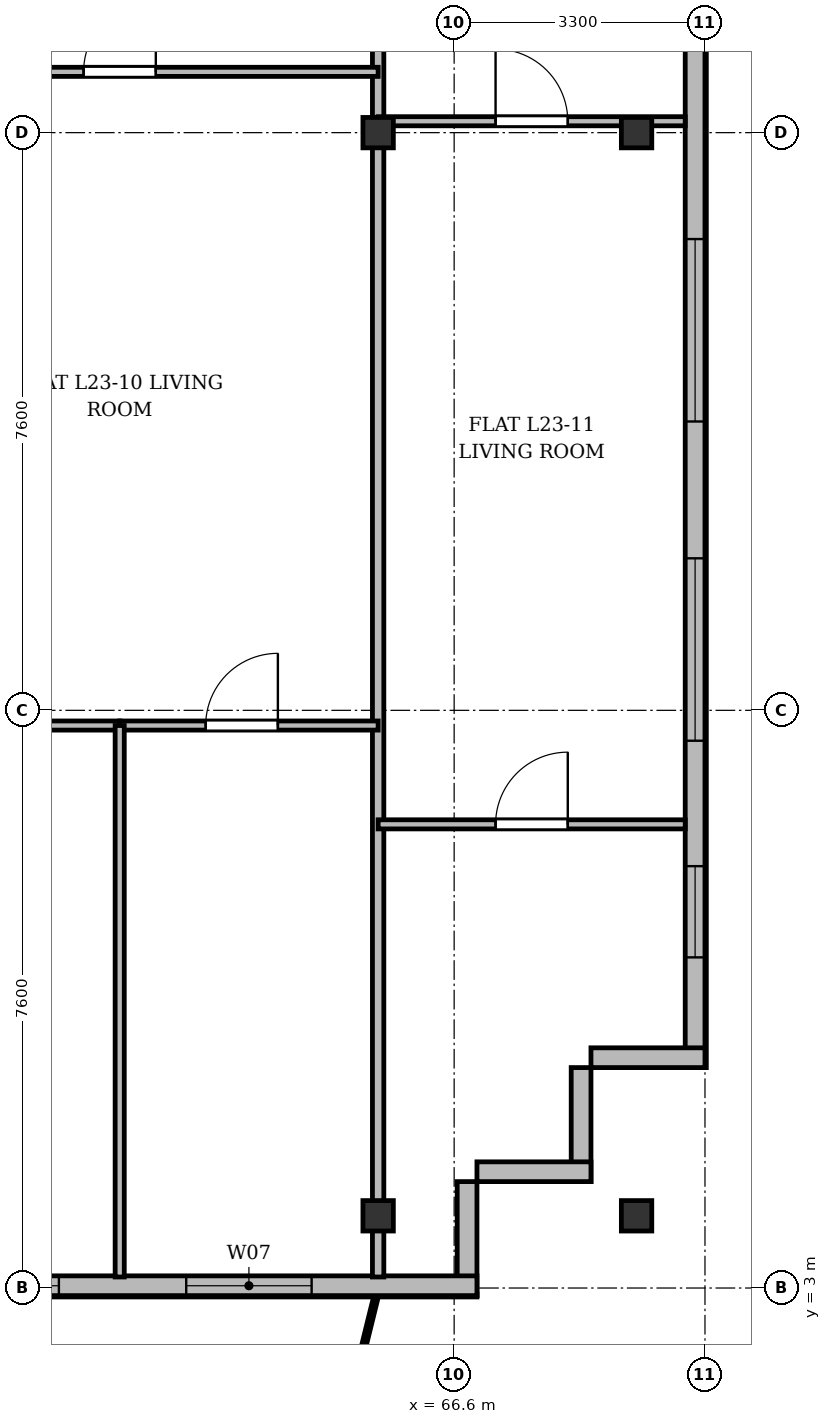
"""IFC4 building model, lengths in metres.
Left out: names, types, materials, properties, quantities, classifications, styles, units other than length and angle.
Written with IfcOpenShell. Run it as: python <this file> out.ifc"""

import sys

from ifc_helpers import new_model, si_unit, direction, frame, frame_2d, origin, origin_2d, place, context, subcontext, project, spatial, rectangle, i_section, extrude, source, transform, mapped, element, fill, save


model = new_model("IFC4")
c1 = context("Model", 3, precision=1e-05, world=origin(), true_north=direction((0.0, 1.0)))
c2 = subcontext(c1, "Body", "Model", "MODEL_VIEW")
j1 = project(units=[si_unit("LENGTHUNIT", "METRE"), si_unit("PLANEANGLEUNIT", "RADIAN")], contexts=[c1])
p1 = place(None, origin())
s1 = spatial("IfcSite", under=j1, at=p1, CompositionType="ELEMENT")
p2 = place(p1, origin())
s2 = spatial("IfcBuilding", under=s1, at=p2, CompositionType="ELEMENT")
p3 = place(p2, frame((0.0, 0.0, 92.5)))
s3 = spatial("IfcBuildingStorey", under=s2, at=p3, CompositionType="ELEMENT", Elevation=92.5)
m1 = source(origin(), c2, "Body", "SweptSolid", [
    extrude(i_section(OverallWidth=0.4, OverallDepth=0.4, WebThickness=0.022, FlangeThickness=0.035, at=origin_2d()), origin(), (0.0, 0.0, 1.0), 3.6),
])
for number, where, z_axis, x_axis in (
    (1, (65.6, 3.95, 0.0), (0.0, 0.0, 1.0), (1.0, 0.0, 0.0)),
    (2, (65.6, 18.2, 0.0), (0.0, 0.0, 1.0), (1.0, 0.0, 0.0)),
    (3, (69.0, 3.95, 0.0), (0.0, 0.0, 1.0), (1.0, 0.0, 0.0)),
    (4, (69.0, 18.2, 0.0), (0.0, 0.0, 1.0), (1.0, 0.0, 0.0)),
):
    element("IfcColumn", number, at=place(p3, frame(where, z_axis=z_axis, x_axis=x_axis)), inside=s3, PredefinedType="COLUMN", context=c2, shape_type="MappedRepresentation", body=[
        mapped(m1, transform((0.0, 0.0, 0.0), x_axis=(1.0, 0.0, 0.0), y_axis=(0.0, 1.0, 0.0), z_axis=(0.0, 0.0, 1.0), scale=1.0)),
    ])
p4 = place(p3, frame((69.77, 45.5, 0.0), z_axis=(0.0, 0.0, 1.0), x_axis=(0.0, -1.0, 0.0)))
e5 = element("IfcWall", 5, at=p4, inside=s3, PredefinedType="SOLIDWALL", context=c2, shape_type="SweptSolid", body=[
    extrude(rectangle(XDim=39.6, YDim=0.26, at=frame_2d((19.8, 0.0))), origin(), (0.0, 0.0, 1.0), 3.34),
])
p5 = place(p4, frame((36.95, 0.0, 0.92)))
e6 = element("IfcOpeningElement", 6, at=p5, cuts=e5, PredefinedType="OPENING", context=c2, shape_type="SweptSolid", body=[
    extrude(rectangle(XDim=1.2, YDim=1.65, at=frame_2d((0.6, 0.825))), frame((0.0, 0.14, 0.0), z_axis=(0.0, -1.0, 0.0), x_axis=(1.0, 0.0, 0.0)), (0.0, 0.0, 1.0), 0.28),
])
p6 = place(p4, frame((32.9, 0.0, 0.92)))
e7 = element("IfcOpeningElement", 7, at=p6, cuts=e5, PredefinedType="OPENING", context=c2, shape_type="SweptSolid", body=[
    extrude(rectangle(XDim=2.4, YDim=2.1, at=frame_2d((1.2, 1.05))), frame((0.0, 0.14, 0.0), z_axis=(0.0, -1.0, 0.0), x_axis=(1.0, 0.0, 0.0)), (0.0, 0.0, 1.0), 0.28),
])
p7 = place(p4, frame((28.7, 0.0, 0.92)))
e8 = element("IfcOpeningElement", 8, at=p7, cuts=e5, PredefinedType="OPENING", context=c2, shape_type="SweptSolid", body=[
    extrude(rectangle(XDim=2.4, YDim=2.1, at=frame_2d((1.2, 1.05))), frame((0.0, 0.14, 0.0), z_axis=(0.0, -1.0, 0.0), x_axis=(1.0, 0.0, 0.0)), (0.0, 0.0, 1.0), 0.28),
])
p8 = place(p4, frame((21.5, 0.0, 0.92)))
e9 = element("IfcOpeningElement", 9, at=p8, cuts=e5, PredefinedType="OPENING", context=c2, shape_type="SweptSolid", body=[
    extrude(rectangle(XDim=2.4, YDim=2.1, at=frame_2d((1.2, 1.05))), frame((0.0, 0.14, 0.0), z_axis=(0.0, -1.0, 0.0), x_axis=(1.0, 0.0, 0.0)), (0.0, 0.0, 1.0), 0.28),
])
p9 = place(p4, frame((7.5, 0.0, 0.92)))
e10 = element("IfcOpeningElement", 10, at=p9, cuts=e5, PredefinedType="OPENING", context=c2, shape_type="SweptSolid", body=[
    extrude(rectangle(XDim=2.4, YDim=2.1, at=frame_2d((1.2, 1.05))), frame((0.0, 0.14, 0.0), z_axis=(0.0, -1.0, 0.0), x_axis=(1.0, 0.0, 0.0)), (0.0, 0.0, 1.0), 0.28),
])
p10 = place(p4, frame((4.5, 0.0, 0.92)))
e11 = element("IfcOpeningElement", 11, at=p10, cuts=e5, PredefinedType="OPENING", context=c2, shape_type="SweptSolid", body=[
    extrude(rectangle(XDim=1.2, YDim=1.65, at=frame_2d((0.6, 0.825))), frame((0.0, 0.14, 0.0), z_axis=(0.0, -1.0, 0.0), x_axis=(1.0, 0.0, 0.0)), (0.0, 0.0, 1.0), 0.28),
])
p11 = place(p4, frame((1.15, 0.0, 0.92)))
e12 = element("IfcOpeningElement", 12, at=p11, cuts=e5, PredefinedType="OPENING", context=c2, shape_type="SweptSolid", body=[
    extrude(rectangle(XDim=1.2, YDim=1.65, at=frame_2d((0.6, 0.825))), frame((0.0, 0.14, 0.0), z_axis=(0.0, -1.0, 0.0), x_axis=(1.0, 0.0, 0.0)), (0.0, 0.0, 1.0), 0.28),
])
p12 = place(p3, frame((69.9, 6.03, 0.0), z_axis=(0.0, 0.0, 1.0), x_axis=(-1.0, 0.0, 0.0)))
e13 = element("IfcWall", 13, at=p12, inside=s3, PredefinedType="SOLIDWALL", context=c2, shape_type="SweptSolid", body=[
    extrude(rectangle(XDim=1.5, YDim=0.26, at=frame_2d((0.75, 0.0))), origin(), (0.0, 0.0, 1.0), 2.84),
])
for number, where, z_axis, x_axis in (
    (14, (68.27, 5.9, 0.0), (0.0, 0.0, 1.0), (0.0, -1.0, 0.0)),
    (15, (68.4, 4.53, 0.0), (0.0, 0.0, 1.0), (-1.0, 0.0, 0.0)),
):
    element("IfcWall", number, at=place(p3, frame(where, z_axis=z_axis, x_axis=x_axis)), inside=s3, PredefinedType="SOLIDWALL", context=c2, shape_type="SweptSolid", body=[
        extrude(rectangle(XDim=1.5, YDim=0.26, at=frame_2d((0.75, 0.0))), origin(), (0.0, 0.0, 1.0), 3.34),
    ])
p13 = place(p3, frame((66.77, 4.4, 0.0), z_axis=(0.0, 0.0, 1.0), x_axis=(0.0, -1.0, 0.0)))
e16 = element("IfcWall", 16, at=p13, inside=s3, PredefinedType="SOLIDWALL", context=c2, shape_type="SweptSolid", body=[
    extrude(rectangle(XDim=1.5, YDim=0.26, at=frame_2d((0.75, 0.0))), origin(), (0.0, 0.0, 1.0), 2.752),
])
p14 = place(p3, frame((66.9, 3.03, 0.0), z_axis=(0.0, 0.0, 1.0), x_axis=(-1.0, 0.0, 0.0)))
e17 = element("IfcWall", 17, at=p14, inside=s3, PredefinedType="SOLIDWALL", context=c2, shape_type="SweptSolid", body=[
    extrude(rectangle(XDim=59.4, YDim=0.26, at=frame_2d((29.7, 0.0))), origin(), (0.0, 0.0, 1.0), 3.34),
])
p15 = place(p14, frame((2.175, 0.0, 0.9)))
e18 = element("IfcOpeningElement", 18, at=p15, cuts=e17, PredefinedType="OPENING", context=c2, shape_type="SweptSolid", body=[
    extrude(rectangle(XDim=1.65, YDim=1.85, at=frame_2d((0.825, 0.925))), frame((0.0, 0.14, 0.0), z_axis=(0.0, -1.0, 0.0), x_axis=(1.0, 0.0, 0.0)), (0.0, 0.0, 1.0), 0.28),
])
p16 = place(p14, frame((5.5, 0.0, 0.9)))
e19 = element("IfcOpeningElement", 19, at=p16, cuts=e17, PredefinedType="OPENING", context=c2, shape_type="SweptSolid", body=[
    extrude(rectangle(XDim=1.8, YDim=1.8, at=frame_2d((0.9, 0.9))), frame((0.0, 0.14, 0.0), z_axis=(0.0, -1.0, 0.0), x_axis=(1.0, 0.0, 0.0)), (0.0, 0.0, 1.0), 0.28),
])
p17 = place(p14, frame((8.65, 0.0, 0.9)))
e20 = element("IfcOpeningElement", 20, at=p17, cuts=e17, PredefinedType="OPENING", context=c2, shape_type="SweptSolid", body=[
    extrude(rectangle(XDim=1.5, YDim=1.75, at=frame_2d((0.75, 0.875))), frame((0.0, 0.14, 0.0), z_axis=(0.0, -1.0, 0.0), x_axis=(1.0, 0.0, 0.0)), (0.0, 0.0, 1.0), 0.28),
])
p18 = place(p14, frame((11.25, 0.0, 0.9)))
e21 = element("IfcOpeningElement", 21, at=p18, cuts=e17, PredefinedType="OPENING", context=c2, shape_type="SweptSolid", body=[
    extrude(rectangle(XDim=1.5, YDim=1.75, at=frame_2d((0.75, 0.875))), frame((0.0, 0.14, 0.0), z_axis=(0.0, -1.0, 0.0), x_axis=(1.0, 0.0, 0.0)), (0.0, 0.0, 1.0), 0.28),
])
p19 = place(p14, frame((13.6, 0.0, 0.9)))
e22 = element("IfcOpeningElement", 22, at=p19, cuts=e17, PredefinedType="OPENING", context=c2, shape_type="SweptSolid", body=[
    extrude(rectangle(XDim=2.0, YDim=1.95, at=frame_2d((1.0, 0.975))), frame((0.0, 0.14, 0.0), z_axis=(0.0, -1.0, 0.0), x_axis=(1.0, 0.0, 0.0)), (0.0, 0.0, 1.0), 0.28),
])
p20 = place(p14, frame((16.775, 0.0, 0.9)))
e23 = element("IfcOpeningElement", 23, at=p20, cuts=e17, PredefinedType="OPENING", context=c2, shape_type="SweptSolid", body=[
    extrude(rectangle(XDim=1.65, YDim=1.85, at=frame_2d((0.825, 0.925))), frame((0.0, 0.14, 0.0), z_axis=(0.0, -1.0, 0.0), x_axis=(1.0, 0.0, 0.0)), (0.0, 0.0, 1.0), 0.28),
])
p21 = place(p14, frame((20.227, 0.0, 0.0)))
e24 = element("IfcOpeningElement", 24, at=p21, cuts=e17, PredefinedType="OPENING", context=c2, shape_type="SweptSolid", body=[
    extrude(rectangle(XDim=1.2, YDim=2.2, at=frame_2d((0.6, 1.1))), frame((0.0, 0.14, 0.0), z_axis=(0.0, -1.0, 0.0), x_axis=(1.0, 0.0, 0.0)), (0.0, 0.0, 1.0), 0.28),
])
p22 = place(p14, frame((28.6, 0.0, 0.9)))
e25 = element("IfcOpeningElement", 25, at=p22, cuts=e17, PredefinedType="OPENING", context=c2, shape_type="SweptSolid", body=[
    extrude(rectangle(XDim=2.2, YDim=1.8, at=frame_2d((1.1, 0.9))), frame((0.0, 0.14, 0.0), z_axis=(0.0, -1.0, 0.0), x_axis=(1.0, 0.0, 0.0)), (0.0, 0.0, 1.0), 0.28),
])
p23 = place(p14, frame((36.75, 0.0, 0.9)))
e26 = element("IfcOpeningElement", 26, at=p23, cuts=e17, PredefinedType="OPENING", context=c2, shape_type="SweptSolid", body=[
    extrude(rectangle(XDim=1.5, YDim=1.75, at=frame_2d((0.75, 0.875))), frame((0.0, 0.14, 0.0), z_axis=(0.0, -1.0, 0.0), x_axis=(1.0, 0.0, 0.0)), (0.0, 0.0, 1.0), 0.28),
])
p24 = place(p14, frame((39.15, 0.0, 0.9)))
e27 = element("IfcOpeningElement", 27, at=p24, cuts=e17, PredefinedType="OPENING", context=c2, shape_type="SweptSolid", body=[
    extrude(rectangle(XDim=1.5, YDim=1.75, at=frame_2d((0.75, 0.875))), frame((0.0, 0.14, 0.0), z_axis=(0.0, -1.0, 0.0), x_axis=(1.0, 0.0, 0.0)), (0.0, 0.0, 1.0), 0.28),
])
p25 = place(p14, frame((41.475, 0.0, 0.9)))
e28 = element("IfcOpeningElement", 28, at=p25, cuts=e17, PredefinedType="OPENING", context=c2, shape_type="SweptSolid", body=[
    extrude(rectangle(XDim=1.65, YDim=1.85, at=frame_2d((0.825, 0.925))), frame((0.0, 0.14, 0.0), z_axis=(0.0, -1.0, 0.0), x_axis=(1.0, 0.0, 0.0)), (0.0, 0.0, 1.0), 0.28),
])
p26 = place(p14, frame((45.36, 0.0, 0.0)))
e29 = element("IfcOpeningElement", 29, at=p26, cuts=e17, PredefinedType="OPENING", context=c2, shape_type="SweptSolid", body=[
    extrude(rectangle(XDim=1.2, YDim=2.2, at=frame_2d((0.6, 1.1))), frame((0.0, 0.14, 0.0), z_axis=(0.0, -1.0, 0.0), x_axis=(1.0, 0.0, 0.0)), (0.0, 0.0, 1.0), 0.28),
])
p27 = place(p14, frame((48.2, 0.0, 0.9)))
e30 = element("IfcOpeningElement", 30, at=p27, cuts=e17, PredefinedType="OPENING", context=c2, shape_type="SweptSolid", body=[
    extrude(rectangle(XDim=2.2, YDim=1.8, at=frame_2d((1.1, 0.9))), frame((0.0, 0.14, 0.0), z_axis=(0.0, -1.0, 0.0), x_axis=(1.0, 0.0, 0.0)), (0.0, 0.0, 1.0), 0.28),
])
p28 = place(p14, frame((52.25, 0.0, 0.9)))
e31 = element("IfcOpeningElement", 31, at=p28, cuts=e17, PredefinedType="OPENING", context=c2, shape_type="SweptSolid", body=[
    extrude(rectangle(XDim=1.5, YDim=1.75, at=frame_2d((0.75, 0.875))), frame((0.0, 0.14, 0.0), z_axis=(0.0, -1.0, 0.0), x_axis=(1.0, 0.0, 0.0)), (0.0, 0.0, 1.0), 0.28),
])
p29 = place(p14, frame((55.4, 0.0, 0.9)))
e32 = element("IfcOpeningElement", 32, at=p29, cuts=e17, PredefinedType="OPENING", context=c2, shape_type="SweptSolid", body=[
    extrude(rectangle(XDim=2.0, YDim=1.95, at=frame_2d((1.0, 0.975))), frame((0.0, 0.14, 0.0), z_axis=(0.0, -1.0, 0.0), x_axis=(1.0, 0.0, 0.0)), (0.0, 0.0, 1.0), 0.28),
])
p30 = place(p3, frame((65.6, 3.145, 0.0), z_axis=(0.0, 0.0, 1.0), x_axis=(0.0, 1.0, 0.0)))
e33 = element("IfcWall", 33, at=p30, inside=s3, PredefinedType="PARTITIONING", context=c2, shape_type="SweptSolid", body=[
    extrude(rectangle(XDim=24.455, YDim=0.15, at=frame_2d((12.228, 0.0))), origin(), (0.0, 0.0, 1.0), 2.84),
])
p31 = place(p3, frame((58.8, 19.0, 0.0), z_axis=(0.0, 0.0, 1.0), x_axis=(1.0, 0.0, 0.0)))
e34 = element("IfcWall", 34, at=p31, inside=s3, PredefinedType="PARTITIONING", context=c2, shape_type="SweptSolid", body=[
    extrude(rectangle(XDim=6.8, YDim=0.12, at=frame_2d((3.4, 0.0))), origin(), (0.0, 0.0, 1.0), 2.84),
])
p32 = place(p31, frame((2.925, 0.0, 0.0)))
e35 = element("IfcOpeningElement", 35, at=p32, cuts=e34, PredefinedType="OPENING", context=c2, shape_type="SweptSolid", body=[
    extrude(rectangle(XDim=0.95, YDim=2.15, at=frame_2d((0.475, 1.075))), frame((0.0, 0.07, 0.0), z_axis=(0.0, -1.0, 0.0), x_axis=(1.0, 0.0, 0.0)), (0.0, 0.0, 1.0), 0.14),
])
p33 = place(p3, frame((58.8, 10.4, 0.0), z_axis=(0.0, 0.0, 1.0), x_axis=(1.0, 0.0, 0.0)))
e36 = element("IfcWall", 36, at=p33, inside=s3, PredefinedType="PARTITIONING", context=c2, shape_type="SweptSolid", body=[
    extrude(rectangle(XDim=3.4, YDim=0.12, at=frame_2d((1.7, 0.0))), origin(), (0.0, 0.0, 1.0), 2.84),
])
p34 = place(p33, frame((1.131, 0.0, 0.0)))
e37 = element("IfcOpeningElement", 37, at=p34, cuts=e36, PredefinedType="OPENING", context=c2, shape_type="SweptSolid", body=[
    extrude(rectangle(XDim=0.95, YDim=2.15, at=frame_2d((0.475, 1.075))), frame((0.0, 0.07, 0.0), z_axis=(0.0, -1.0, 0.0), x_axis=(1.0, 0.0, 0.0)), (0.0, 0.0, 1.0), 0.14),
])
p35 = place(p3, frame((62.2, 10.4, 0.0), z_axis=(0.0, 0.0, 1.0), x_axis=(1.0, 0.0, 0.0)))
e38 = element("IfcWall", 38, at=p35, inside=s3, PredefinedType="PARTITIONING", context=c2, shape_type="SweptSolid", body=[
    extrude(rectangle(XDim=3.4, YDim=0.12, at=frame_2d((1.7, 0.0))), origin(), (0.0, 0.0, 1.0), 2.84),
])
p36 = place(p35, frame((1.131, 0.0, 0.0)))
e39 = element("IfcOpeningElement", 39, at=p36, cuts=e38, PredefinedType="OPENING", context=c2, shape_type="SweptSolid", body=[
    extrude(rectangle(XDim=0.95, YDim=2.15, at=frame_2d((0.475, 1.075))), frame((0.0, 0.07, 0.0), z_axis=(0.0, -1.0, 0.0), x_axis=(1.0, 0.0, 0.0)), (0.0, 0.0, 1.0), 0.14),
])
p37 = place(p3, frame((62.2, 3.145, 0.0), z_axis=(0.0, 0.0, 1.0), x_axis=(0.0, 1.0, 0.0)))
e40 = element("IfcWall", 40, at=p37, inside=s3, PredefinedType="PARTITIONING", context=c2, shape_type="SweptSolid", body=[
    extrude(rectangle(XDim=7.255, YDim=0.12, at=frame_2d((3.627, 0.0))), origin(), (0.0, 0.0, 1.0), 2.752),
])
p38 = place(p3, frame((65.6, 18.35, 0.0), z_axis=(0.0, 0.0, 1.0), x_axis=(1.0, 0.0, 0.0)))
e41 = element("IfcWall", 41, at=p38, inside=s3, PredefinedType="PARTITIONING", context=c2, shape_type="SweptSolid", body=[
    extrude(rectangle(XDim=4.04, YDim=0.12, at=frame_2d((2.02, 0.0))), origin(), (0.0, 0.0, 1.0), 2.752),
])
p39 = place(p38, frame((1.545, 0.0, 0.0)))
e42 = element("IfcOpeningElement", 42, at=p39, cuts=e41, PredefinedType="OPENING", context=c2, shape_type="SweptSolid", body=[
    extrude(rectangle(XDim=0.95, YDim=2.15, at=frame_2d((0.475, 1.075))), frame((0.0, 0.07, 0.0), z_axis=(0.0, -1.0, 0.0), x_axis=(1.0, 0.0, 0.0)), (0.0, 0.0, 1.0), 0.14),
])
p40 = place(p3, frame((65.6, 9.1, 0.0), z_axis=(0.0, 0.0, 1.0), x_axis=(1.0, 0.0, 0.0)))
e43 = element("IfcWall", 43, at=p40, inside=s3, PredefinedType="PARTITIONING", context=c2, shape_type="SweptSolid", body=[
    extrude(rectangle(XDim=4.04, YDim=0.12, at=frame_2d((2.02, 0.0))), origin(), (0.0, 0.0, 1.0), 2.84),
])
p41 = place(p40, frame((1.545, 0.0, 0.0)))
e44 = element("IfcOpeningElement", 44, at=p41, cuts=e43, PredefinedType="OPENING", context=c2, shape_type="SweptSolid", body=[
    extrude(rectangle(XDim=0.95, YDim=2.15, at=frame_2d((0.475, 1.075))), frame((0.0, 0.07, 0.0), z_axis=(0.0, -1.0, 0.0), x_axis=(1.0, 0.0, 0.0)), (0.0, 0.0, 1.0), 0.14),
])
m2 = source(origin(), c2, "Body", "SweptSolid", [
    extrude(rectangle(XDim=1.2, YDim=1.65, at=frame_2d((0.6, 0.825))), frame((0.0, 0.03, 0.0), z_axis=(0.0, -1.0, 0.0), x_axis=(1.0, 0.0, 0.0)), (0.0, 0.0, 1.0), 0.06),
])
p42 = place(p5, origin())
e45 = element("IfcWindow", 45, at=p42, inside=s3, PartitioningType="SINGLE_PANEL", PredefinedType="WINDOW", context=c2, shape_type="MappedRepresentation", body=[
    mapped(m2, transform((0.0, 0.0, 0.0), x_axis=(1.0, 0.0, 0.0), y_axis=(0.0, 1.0, 0.0), z_axis=(0.0, 0.0, 1.0), scale=1.0)),
])
fill(e6, e45)
m3 = source(origin(), c2, "Body", "SweptSolid", [
    extrude(rectangle(XDim=2.4, YDim=2.1, at=frame_2d((1.2, 1.05))), frame((0.0, 0.03, 0.0), z_axis=(0.0, -1.0, 0.0), x_axis=(1.0, 0.0, 0.0)), (0.0, 0.0, 1.0), 0.06),
])
p43 = place(p6, origin())
e46 = element("IfcWindow", 46, at=p43, inside=s3, PartitioningType="SINGLE_PANEL", PredefinedType="WINDOW", context=c2, shape_type="MappedRepresentation", body=[
    mapped(m3, transform((0.0, 0.0, 0.0), x_axis=(1.0, 0.0, 0.0), y_axis=(0.0, 1.0, 0.0), z_axis=(0.0, 0.0, 1.0), scale=1.0)),
])
fill(e7, e46)
p44 = place(p7, origin())
e47 = element("IfcWindow", 47, at=p44, inside=s3, PartitioningType="SINGLE_PANEL", PredefinedType="WINDOW", context=c2, shape_type="MappedRepresentation", body=[
    mapped(m3, transform((0.0, 0.0, 0.0), x_axis=(1.0, 0.0, 0.0), y_axis=(0.0, 1.0, 0.0), z_axis=(0.0, 0.0, 1.0), scale=1.0)),
])
fill(e8, e47)
m4 = source(origin(), c2, "Body", "SweptSolid", [
    extrude(rectangle(XDim=1.65, YDim=1.85, at=frame_2d((0.825, 0.925))), frame((0.0, 0.03, 0.0), z_axis=(0.0, -1.0, 0.0), x_axis=(1.0, 0.0, 0.0)), (0.0, 0.0, 1.0), 0.06),
])
p45 = place(p15, origin())
e48 = element("IfcWindow", 48, at=p45, inside=s3, PartitioningType="SINGLE_PANEL", PredefinedType="WINDOW", context=c2, shape_type="MappedRepresentation", body=[
    mapped(m4, transform((0.0, 0.0, 0.0), x_axis=(1.0, 0.0, 0.0), y_axis=(0.0, 1.0, 0.0), z_axis=(0.0, 0.0, 1.0), scale=1.0)),
])
fill(e18, e48)
m5 = source(origin(), c2, "Body", "SweptSolid", [
    extrude(rectangle(XDim=1.8, YDim=1.8, at=frame_2d((0.9, 0.9))), frame((0.0, 0.03, 0.0), z_axis=(0.0, -1.0, 0.0), x_axis=(1.0, 0.0, 0.0)), (0.0, 0.0, 1.0), 0.06),
])
p46 = place(p16, origin())
e49 = element("IfcWindow", 49, at=p46, inside=s3, PartitioningType="SINGLE_PANEL", PredefinedType="WINDOW", context=c2, shape_type="MappedRepresentation", body=[
    mapped(m5, transform((0.0, 0.0, 0.0), x_axis=(1.0, 0.0, 0.0), y_axis=(0.0, 1.0, 0.0), z_axis=(0.0, 0.0, 1.0), scale=1.0)),
])
fill(e19, e49)
m6 = source(origin(), c2, "Body", "SweptSolid", [
    extrude(rectangle(XDim=0.95, YDim=2.15, at=frame_2d((0.475, 1.075))), frame((0.0, 0.025, 0.0), z_axis=(0.0, -1.0, 0.0), x_axis=(1.0, 0.0, 0.0)), (0.0, 0.0, 1.0), 0.05),
])
p47 = place(p32, origin())
e50 = element("IfcDoor", 50, at=p47, inside=s3, OperationType="SINGLE_SWING_RIGHT", PredefinedType="DOOR", context=c2, shape_type="MappedRepresentation", body=[
    mapped(m6, transform((0.0, 0.0, 0.0), x_axis=(1.0, 0.0, 0.0), y_axis=(0.0, 1.0, 0.0), z_axis=(0.0, 0.0, 1.0), scale=1.0)),
])
fill(e35, e50)
p48 = place(p36, origin())
e51 = element("IfcDoor", 51, at=p48, inside=s3, OperationType="SINGLE_SWING_RIGHT", PredefinedType="DOOR", context=c2, shape_type="MappedRepresentation", body=[
    mapped(m6, transform((0.0, 0.0, 0.0), x_axis=(1.0, 0.0, 0.0), y_axis=(0.0, 1.0, 0.0), z_axis=(0.0, 0.0, 1.0), scale=1.0)),
])
fill(e39, e51)
p49 = place(p39, origin())
e52 = element("IfcDoor", 52, at=p49, inside=s3, OperationType="SINGLE_SWING_LEFT", PredefinedType="DOOR", context=c2, shape_type="MappedRepresentation", body=[
    mapped(m6, transform((0.0, 0.0, 0.0), x_axis=(1.0, 0.0, 0.0), y_axis=(0.0, 1.0, 0.0), z_axis=(0.0, 0.0, 1.0), scale=1.0)),
])
fill(e42, e52)
p50 = place(p41, origin())
e53 = element("IfcDoor", 53, at=p50, inside=s3, OperationType="SINGLE_SWING_RIGHT", PredefinedType="DOOR", context=c2, shape_type="MappedRepresentation", body=[
    mapped(m6, transform((0.0, 0.0, 0.0), x_axis=(1.0, 0.0, 0.0), y_axis=(0.0, 1.0, 0.0), z_axis=(0.0, 0.0, 1.0), scale=1.0)),
])
fill(e44, e53)
save(model, sys.argv[1])
